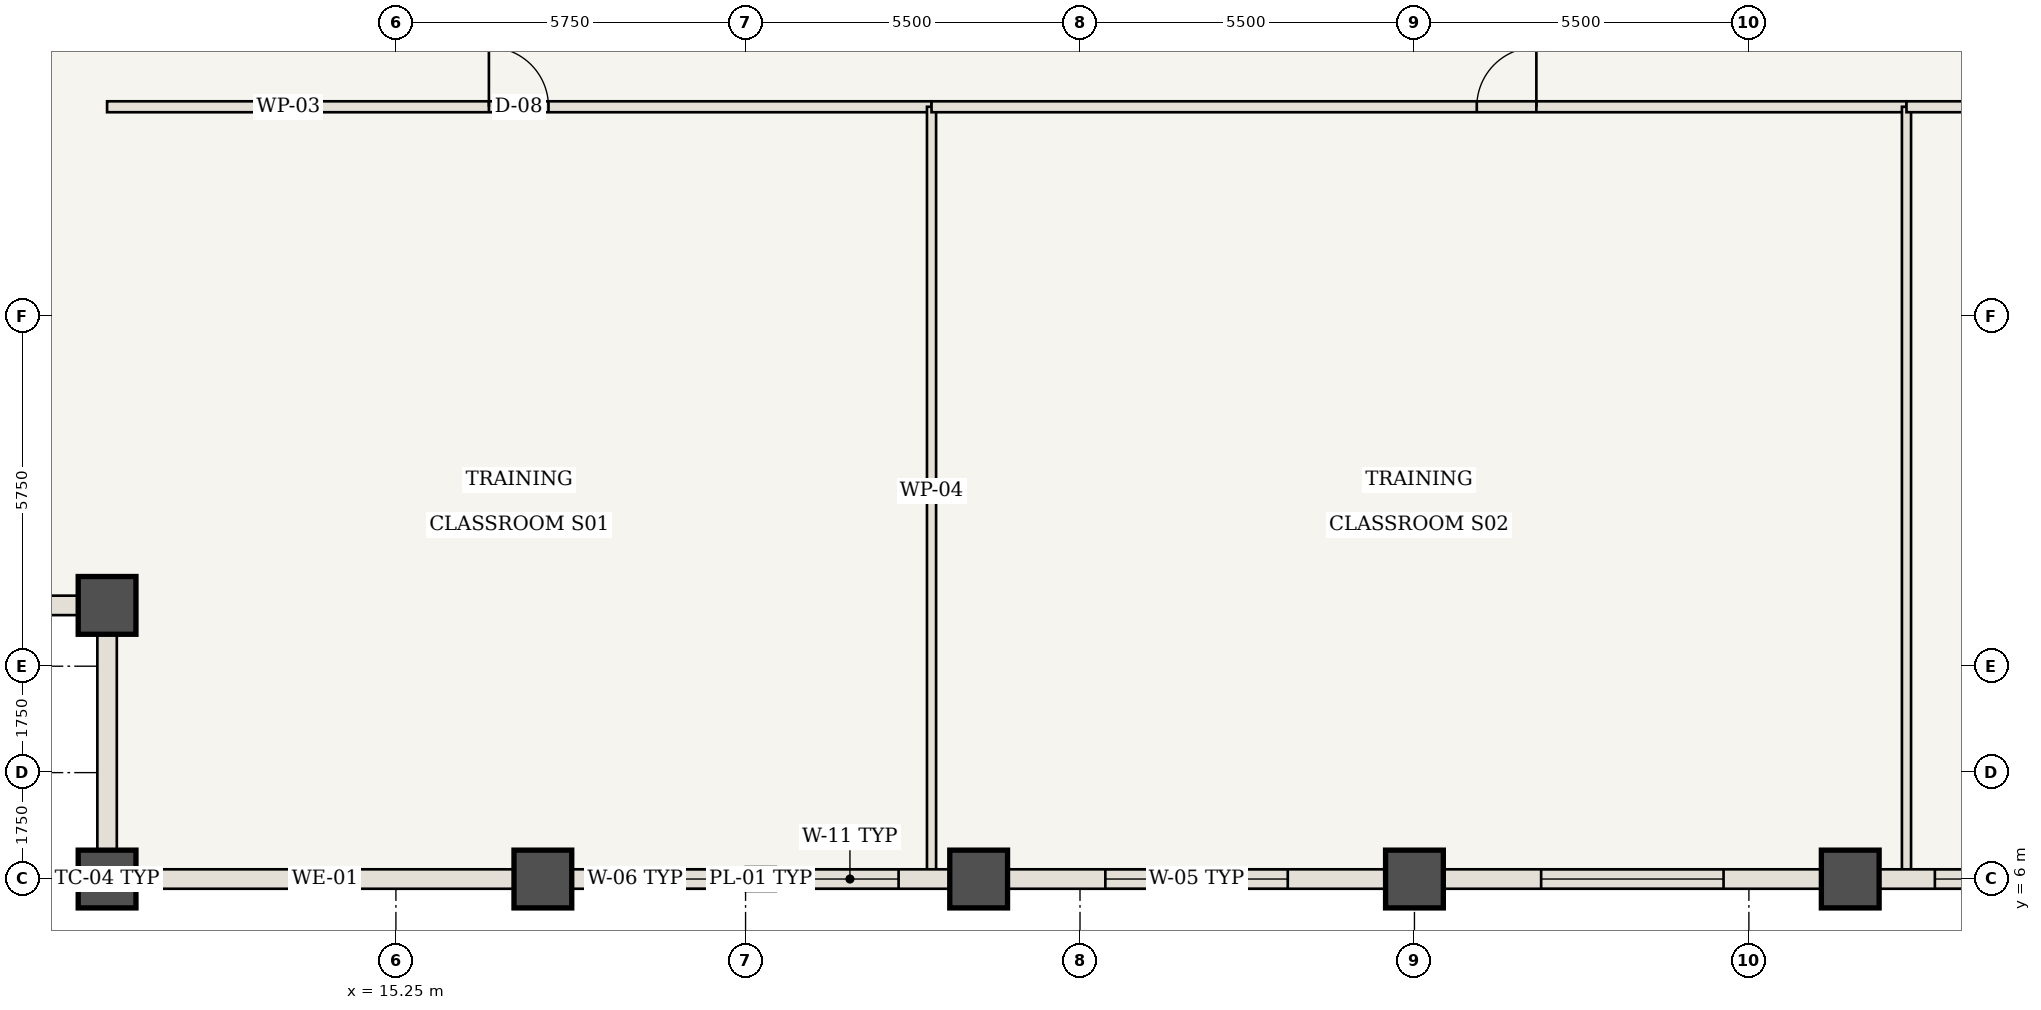
"""IFC4 building model, lengths in metres.
Left out: names, types, materials, properties, quantities, classifications, styles, units other than length and angle.
Written with IfcOpenShell. Run it as: python <this file> out.ifc"""

import sys

from ifc_helpers import new_model, si_unit, direction, frame, frame_2d, origin, origin_2d, place, context, subcontext, project, spatial, rectangle, extrude, element, fill, save


model = new_model("IFC4")
c1 = context("Model", 3, precision=1e-05, world=origin(), true_north=direction((0.0, 1.0)))
c2 = subcontext(c1, "Body", "Model", "MODEL_VIEW")
j1 = project(units=[si_unit("LENGTHUNIT", "METRE"), si_unit("PLANEANGLEUNIT", "RADIAN")], contexts=[c1])
p1 = place(None, origin())
s1 = spatial("IfcSite", under=j1, at=p1, CompositionType="ELEMENT")
p2 = place(p1, origin())
s2 = spatial("IfcBuilding", under=s1, at=p2, CompositionType="ELEMENT")
p3 = place(p2, frame((0.0, 0.0, 137.55)))
s3 = spatial("IfcBuildingStorey", under=s2, at=p3, CompositionType="ELEMENT", Elevation=137.55)
for number, where, z_axis, x_axis in (
    (1, (10.5, 6.0, 0.0), (0.0, 0.0, 1.0), (1.0, 0.0, 0.0)),
    (2, (10.5, 10.5, 0.0), (0.0, 0.0, 1.0), (1.0, 0.0, 0.0)),
    (3, (17.667, 6.0, 0.0), (0.0, 0.0, 1.0), (1.0, 0.0, 0.0)),
    (4, (24.833, 6.0, 0.0), (0.0, 0.0, 1.0), (1.0, 0.0, 0.0)),
    (5, (32.0, 6.0, 0.0), (0.0, 0.0, 1.0), (1.0, 0.0, 0.0)),
    (6, (39.167, 6.0, 0.0), (0.0, 0.0, 1.0), (1.0, 0.0, 0.0)),
):
    element("IfcColumn", number, at=place(p3, frame(where, z_axis=z_axis, x_axis=x_axis)), inside=s3, PredefinedType="COLUMN", context=c2, shape_type="SweptSolid", body=[
        extrude(rectangle(XDim=0.95, YDim=0.95, at=origin_2d()), origin(), (0.0, 0.0, 1.0), 3.85),
    ])
p4 = place(p3, frame((10.5, 18.7, 0.0), z_axis=(0.0, 0.0, 1.0), x_axis=(1.0, 0.0, 0.0)))
e7 = element("IfcWall", 7, at=p4, inside=s3, PredefinedType="STANDARD", context=c2, shape_type="SweptSolid", body=[
    extrude(rectangle(XDim=13.558, YDim=0.18, at=frame_2d((6.779, 0.0))), origin(), (0.0, 0.0, 1.0), 3.685),
])
p5 = place(p4, frame((6.279, 0.0, 0.0)))
e8 = element("IfcOpeningElement", 8, at=p5, cuts=e7, PredefinedType="OPENING", context=c2, shape_type="SweptSolid", body=[
    extrude(rectangle(XDim=0.98, YDim=2.2, at=frame_2d((0.49, 1.1))), frame((0.0, 0.1, 0.0), z_axis=(0.0, -1.0, 0.0), x_axis=(1.0, 0.0, 0.0)), (0.0, 0.0, 1.0), 0.2),
])
p6 = place(p3, frame((24.058, 6.06, 0.0), z_axis=(0.0, 0.0, 1.0), x_axis=(0.0, 1.0, 0.0)))
e9 = element("IfcWall", 9, at=p6, inside=s3, PredefinedType="STANDARD", context=c2, shape_type="SweptSolid", body=[
    extrude(rectangle(XDim=12.64, YDim=0.15, at=frame_2d((6.32, 0.0))), origin(), (0.0, 0.0, 1.0), 3.685),
])
p7 = place(p3, frame((24.058, 18.7, 0.0), z_axis=(0.0, 0.0, 1.0), x_axis=(1.0, 0.0, 0.0)))
e10 = element("IfcWall", 10, at=p7, inside=s3, PredefinedType="STANDARD", context=c2, shape_type="SweptSolid", body=[
    extrude(rectangle(XDim=16.033, YDim=0.18, at=frame_2d((8.017, 0.0))), origin(), (0.0, 0.0, 1.0), 3.685),
])
p8 = place(p7, frame((8.967, 0.0, 0.0)))
e11 = element("IfcOpeningElement", 11, at=p8, cuts=e10, PredefinedType="OPENING", context=c2, shape_type="SweptSolid", body=[
    extrude(rectangle(XDim=0.98, YDim=2.2, at=frame_2d((0.49, 1.1))), frame((0.0, 0.1, 0.0), z_axis=(0.0, -1.0, 0.0), x_axis=(1.0, 0.0, 0.0)), (0.0, 0.0, 1.0), 0.2),
])
p9 = place(p3, frame((40.092, 6.06, 0.0), z_axis=(0.0, 0.0, 1.0), x_axis=(0.0, 1.0, 0.0)))
e12 = element("IfcWall", 12, at=p9, inside=s3, PredefinedType="STANDARD", context=c2, shape_type="SweptSolid", body=[
    extrude(rectangle(XDim=12.64, YDim=0.15, at=frame_2d((6.32, 0.0))), origin(), (0.0, 0.0, 1.0), 3.685),
])
p10 = place(p3, frame((40.092, 18.7, 0.0), z_axis=(0.0, 0.0, 1.0), x_axis=(1.0, 0.0, 0.0)))
e13 = element("IfcWall", 13, at=p10, inside=s3, PredefinedType="STANDARD", context=c2, shape_type="SweptSolid", body=[
    extrude(rectangle(XDim=13.408, YDim=0.18, at=frame_2d((6.704, 0.0))), origin(), (0.0, 0.0, 1.0), 3.685),
])
p11 = place(p10, frame((6.204, 0.0, 0.0)))
e14 = element("IfcOpeningElement", 14, at=p11, cuts=e13, PredefinedType="OPENING", context=c2, shape_type="SweptSolid", body=[
    extrude(rectangle(XDim=0.98, YDim=2.2, at=frame_2d((0.49, 1.1))), frame((0.0, 0.1, 0.0), z_axis=(0.0, -1.0, 0.0), x_axis=(1.0, 0.0, 0.0)), (0.0, 0.0, 1.0), 0.2),
])
p12 = place(p3, frame((17.667, 6.0, 0.0), z_axis=(0.0, 0.0, 1.0), x_axis=(-1.0, 0.0, 0.0)))
e15 = element("IfcWall", 15, at=p12, inside=s3, PredefinedType="USERDEFINED", context=c2, shape_type="SweptSolid", body=[
    extrude(rectangle(XDim=7.167, YDim=0.32, at=frame_2d((3.583, 0.0))), origin(), (0.0, 0.0, 1.0), 2.885),
])
p13 = place(p3, frame((24.833, 6.0, 0.0), z_axis=(0.0, 0.0, 1.0), x_axis=(-1.0, 0.0, 0.0)))
e16 = element("IfcWall", 16, at=p13, inside=s3, PredefinedType="USERDEFINED", context=c2, shape_type="SweptSolid", body=[
    extrude(rectangle(XDim=7.167, YDim=0.32, at=frame_2d((3.583, 0.0))), origin(), (0.0, 0.0, 1.0), 2.885),
])
p14 = place(p13, frame((1.317, 0.0, 0.85)))
e17 = element("IfcOpeningElement", 17, at=p14, cuts=e16, PredefinedType="OPENING", context=c2, shape_type="SweptSolid", body=[
    extrude(rectangle(XDim=1.6, YDim=1.835, at=frame_2d((0.8, 0.917))), frame((0.0, 0.17, 0.0), z_axis=(0.0, -1.0, 0.0), x_axis=(1.0, 0.0, 0.0)), (0.0, 0.0, 1.0), 0.34),
])
p15 = place(p13, frame((4.175, 0.0, 0.85)))
e18 = element("IfcOpeningElement", 18, at=p15, cuts=e16, PredefinedType="OPENING", context=c2, shape_type="SweptSolid", body=[
    extrude(rectangle(XDim=2.2, YDim=1.835, at=frame_2d((1.1, 0.917))), frame((0.0, 0.17, 0.0), z_axis=(0.0, -1.0, 0.0), x_axis=(1.0, 0.0, 0.0)), (0.0, 0.0, 1.0), 0.34),
])
p16 = place(p3, frame((32.0, 6.0, 0.0), z_axis=(0.0, 0.0, 1.0), x_axis=(-1.0, 0.0, 0.0)))
e19 = element("IfcWall", 19, at=p16, inside=s3, PredefinedType="USERDEFINED", context=c2, shape_type="SweptSolid", body=[
    extrude(rectangle(XDim=7.167, YDim=0.32, at=frame_2d((3.583, 0.0))), origin(), (0.0, 0.0, 1.0), 2.885),
])
p17 = place(p16, frame((2.083, 0.0, 0.85)))
e20 = element("IfcOpeningElement", 20, at=p17, cuts=e19, PredefinedType="OPENING", context=c2, shape_type="SweptSolid", body=[
    extrude(rectangle(XDim=3.0, YDim=1.835, at=frame_2d((1.5, 0.917))), frame((0.0, 0.17, 0.0), z_axis=(0.0, -1.0, 0.0), x_axis=(1.0, 0.0, 0.0)), (0.0, 0.0, 1.0), 0.34),
])
p18 = place(p3, frame((39.167, 6.0, 0.0), z_axis=(0.0, 0.0, 1.0), x_axis=(-1.0, 0.0, 0.0)))
e21 = element("IfcWall", 21, at=p18, inside=s3, PredefinedType="USERDEFINED", context=c2, shape_type="SweptSolid", body=[
    extrude(rectangle(XDim=7.167, YDim=0.32, at=frame_2d((3.583, 0.0))), origin(), (0.0, 0.0, 1.0), 2.885),
])
p19 = place(p18, frame((2.083, 0.0, 0.85)))
e22 = element("IfcOpeningElement", 22, at=p19, cuts=e21, PredefinedType="OPENING", context=c2, shape_type="SweptSolid", body=[
    extrude(rectangle(XDim=3.0, YDim=1.835, at=frame_2d((1.5, 0.917))), frame((0.0, 0.17, 0.0), z_axis=(0.0, -1.0, 0.0), x_axis=(1.0, 0.0, 0.0)), (0.0, 0.0, 1.0), 0.34),
])
p20 = place(p3, frame((46.333, 6.0, 0.0), z_axis=(0.0, 0.0, 1.0), x_axis=(-1.0, 0.0, 0.0)))
e23 = element("IfcWall", 23, at=p20, inside=s3, PredefinedType="USERDEFINED", context=c2, shape_type="SweptSolid", body=[
    extrude(rectangle(XDim=7.167, YDim=0.32, at=frame_2d((3.583, 0.0))), origin(), (0.0, 0.0, 1.0), 2.885),
])
p21 = place(p20, frame((0.792, 0.0, 0.85)))
e24 = element("IfcOpeningElement", 24, at=p21, cuts=e23, PredefinedType="OPENING", context=c2, shape_type="SweptSolid", body=[
    extrude(rectangle(XDim=2.2, YDim=1.835, at=frame_2d((1.1, 0.917))), frame((0.0, 0.17, 0.0), z_axis=(0.0, -1.0, 0.0), x_axis=(1.0, 0.0, 0.0)), (0.0, 0.0, 1.0), 0.34),
])
p22 = place(p20, frame((4.175, 0.0, 0.85)))
e25 = element("IfcOpeningElement", 25, at=p22, cuts=e23, PredefinedType="OPENING", context=c2, shape_type="SweptSolid", body=[
    extrude(rectangle(XDim=1.6, YDim=1.835, at=frame_2d((0.8, 0.917))), frame((0.0, 0.17, 0.0), z_axis=(0.0, -1.0, 0.0), x_axis=(1.0, 0.0, 0.0)), (0.0, 0.0, 1.0), 0.34),
])
for number, where, z_axis, x_axis in (
    (26, (10.5, 6.0, 0.0), (0.0, 0.0, 1.0), (0.0, 1.0, 0.0)),
    (27, (10.5, 10.5, 0.0), (0.0, 0.0, 1.0), (-1.0, 0.0, 0.0)),
):
    element("IfcWall", number, at=place(p3, frame(where, z_axis=z_axis, x_axis=x_axis)), inside=s3, PredefinedType="USERDEFINED", context=c2, shape_type="SweptSolid", body=[
        extrude(rectangle(XDim=4.5, YDim=0.32, at=frame_2d((2.25, 0.0))), origin(), (0.0, 0.0, 1.0), 2.885),
    ])
p23 = place(p5, origin())
e28 = element("IfcDoor", 28, at=p23, inside=s3, OperationType="SINGLE_SWING_LEFT", PredefinedType="DOOR", context=c2, shape_type="SweptSolid", body=[
    extrude(rectangle(XDim=0.98, YDim=2.2, at=frame_2d((0.49, 1.1))), frame((0.0, 0.025, 0.0), z_axis=(0.0, -1.0, 0.0), x_axis=(1.0, 0.0, 0.0)), (0.0, 0.0, 1.0), 0.05),
])
fill(e8, e28)
p24 = place(p8, origin())
e29 = element("IfcDoor", 29, at=p24, inside=s3, OperationType="SINGLE_SWING_RIGHT", PredefinedType="DOOR", context=c2, shape_type="SweptSolid", body=[
    extrude(rectangle(XDim=0.98, YDim=2.2, at=frame_2d((0.49, 1.1))), frame((0.0, 0.025, 0.0), z_axis=(0.0, -1.0, 0.0), x_axis=(1.0, 0.0, 0.0)), (0.0, 0.0, 1.0), 0.05),
])
fill(e11, e29)
p25 = place(p14, origin())
e30 = element("IfcWindow", 30, at=p25, inside=s3, PartitioningType="SINGLE_PANEL", PredefinedType="WINDOW", context=c2, shape_type="SweptSolid", body=[
    extrude(rectangle(XDim=1.6, YDim=1.835, at=frame_2d((0.8, 0.917))), frame((0.0, 0.03, 0.0), z_axis=(0.0, -1.0, 0.0), x_axis=(1.0, 0.0, 0.0)), (0.0, 0.0, 1.0), 0.06),
])
fill(e17, e30)
p26 = place(p15, origin())
e31 = element("IfcWindow", 31, at=p26, inside=s3, PartitioningType="SINGLE_PANEL", PredefinedType="WINDOW", context=c2, shape_type="SweptSolid", body=[
    extrude(rectangle(XDim=2.2, YDim=1.835, at=frame_2d((1.1, 0.917))), frame((0.0, 0.03, 0.0), z_axis=(0.0, -1.0, 0.0), x_axis=(1.0, 0.0, 0.0)), (0.0, 0.0, 1.0), 0.06),
])
fill(e18, e31)
p27 = place(p17, origin())
e32 = element("IfcWindow", 32, at=p27, inside=s3, PartitioningType="SINGLE_PANEL", PredefinedType="WINDOW", context=c2, shape_type="SweptSolid", body=[
    extrude(rectangle(XDim=3.0, YDim=1.835, at=frame_2d((1.5, 0.917))), frame((0.0, 0.03, 0.0), z_axis=(0.0, -1.0, 0.0), x_axis=(1.0, 0.0, 0.0)), (0.0, 0.0, 1.0), 0.06),
])
fill(e20, e32)
p28 = place(p19, origin())
e33 = element("IfcWindow", 33, at=p28, inside=s3, PartitioningType="SINGLE_PANEL", PredefinedType="WINDOW", context=c2, shape_type="SweptSolid", body=[
    extrude(rectangle(XDim=3.0, YDim=1.835, at=frame_2d((1.5, 0.917))), frame((0.0, 0.03, 0.0), z_axis=(0.0, -1.0, 0.0), x_axis=(1.0, 0.0, 0.0)), (0.0, 0.0, 1.0), 0.06),
])
fill(e22, e33)
p29 = place(p22, origin())
e34 = element("IfcWindow", 34, at=p29, inside=s3, PartitioningType="SINGLE_PANEL", PredefinedType="WINDOW", context=c2, shape_type="SweptSolid", body=[
    extrude(rectangle(XDim=1.6, YDim=1.835, at=frame_2d((0.8, 0.917))), frame((0.0, 0.03, 0.0), z_axis=(0.0, -1.0, 0.0), x_axis=(1.0, 0.0, 0.0)), (0.0, 0.0, 1.0), 0.06),
])
fill(e25, e34)
save(model, sys.argv[1])
